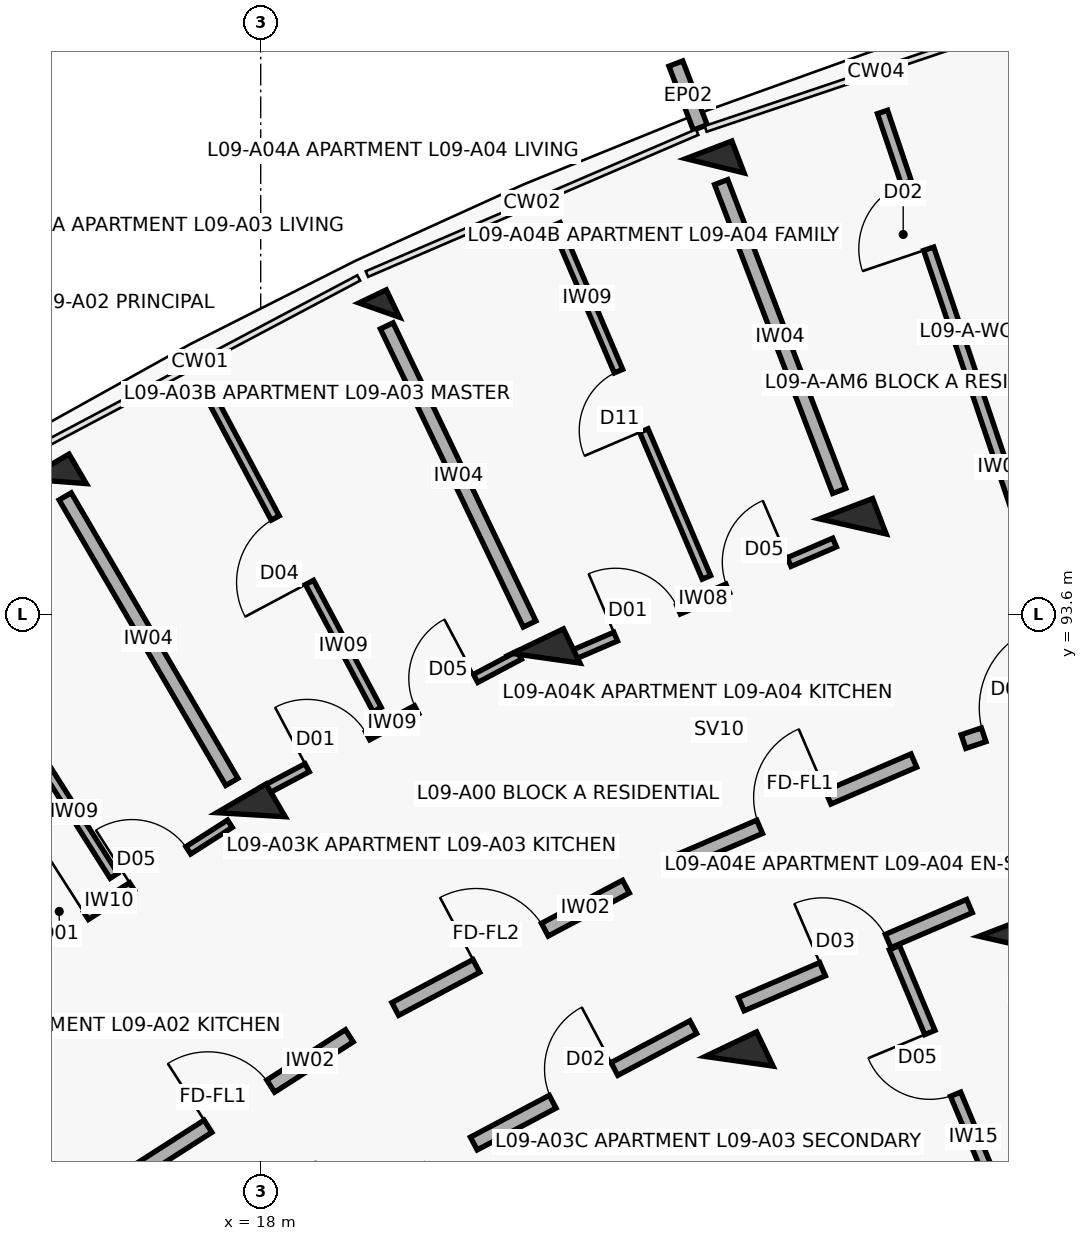
"""IFC4 building model, lengths in metres.
Left out: names, types, materials, properties, quantities, classifications, styles, units other than length and angle.
Written with IfcOpenShell. Run it as: python <this file> out.ifc"""

import sys

from ifc_helpers import new_model, si_unit, direction, frame, frame_2d, origin, origin_2d, place, context, subcontext, project, spatial, rectangle, extrude, element, fill, save


model = new_model("IFC4")
c1 = context("Model", 3, precision=1e-05, world=origin(), true_north=direction((0.0, 1.0)))
c2 = subcontext(c1, "Body", "Model", "MODEL_VIEW")
j1 = project(units=[si_unit("LENGTHUNIT", "METRE"), si_unit("PLANEANGLEUNIT", "RADIAN")], contexts=[c1])
p1 = place(None, origin())
s1 = spatial("IfcSite", under=j1, at=p1, CompositionType="ELEMENT")
p2 = place(p1, origin())
s2 = spatial("IfcBuilding", under=s1, at=p2, CompositionType="ELEMENT")
p3 = place(p2, frame((0.0, 0.0, 29.8)))
s3 = spatial("IfcBuildingStorey", under=s2, at=p3, CompositionType="ELEMENT", Elevation=29.8)
p4 = place(p3, frame((17.873, 90.96, 0.0), z_axis=(0.0, 0.0, 1.0), x_axis=(-0.504226211181, 0.863571611366, 0.0)))
e1 = element("IfcColumn", 1, at=p4, inside=s3, PredefinedType="COLUMN", context=c2, shape_type="SweptSolid", body=[
    extrude(rectangle(XDim=0.5, YDim=0.75, at=origin_2d()), origin(), (0.0, 0.0, 1.0), 3.1),
])
p5 = place(p3, frame((15.311, 95.347, 0.0), z_axis=(0.0, 0.0, 1.0), x_axis=(-0.504226211181, 0.863571611366, 0.0)))
e2 = element("IfcColumn", 2, at=p5, inside=s3, PredefinedType="COLUMN", context=c2, shape_type="SweptSolid", body=[
    extrude(rectangle(XDim=0.45, YDim=0.65, at=origin_2d()), origin(), (0.0, 0.0, 1.0), 3.1),
])
for number, where, z_axis, x_axis in (
    (3, (24.294, 87.716, 0.0), (0.0, 0.0, 1.0), (-0.432, 0.902, 0.0)),
    (4, (21.754, 93.019, 0.0), (0.0, 0.0, 1.0), (-0.432, 0.902, 0.0)),
):
    element("IfcColumn", number, at=place(p3, frame(where, z_axis=z_axis, x_axis=x_axis)), inside=s3, PredefinedType="COLUMN", context=c2, shape_type="SweptSolid", body=[
        extrude(rectangle(XDim=0.5, YDim=0.75, at=origin_2d()), origin(), (0.0, 0.0, 1.0), 3.1),
    ])
p6 = place(p3, frame((19.559, 97.6, 0.0), z_axis=(0.0, 0.0, 1.0), x_axis=(-0.432085748802, 0.901832526405, 0.0)))
e5 = element("IfcColumn", 5, at=p6, inside=s3, PredefinedType="COLUMN", context=c2, shape_type="SweptSolid", body=[
    extrude(rectangle(XDim=0.4, YDim=0.4, at=origin_2d()), origin(), (0.0, 0.0, 1.0), 3.1),
])
for number, where, z_axis, x_axis in (
    (6, (27.889, 89.261, 0.0), (0.0, 0.0, 1.0), (-0.357, 0.934, 0.0)),
    (7, (25.79, 94.753, 0.0), (0.0, 0.0, 1.0), (-0.357, 0.934, 0.0)),
):
    element("IfcColumn", number, at=place(p3, frame(where, z_axis=z_axis, x_axis=x_axis)), inside=s3, PredefinedType="COLUMN", context=c2, shape_type="SweptSolid", body=[
        extrude(rectangle(XDim=0.5, YDim=0.75, at=origin_2d()), origin(), (0.0, 0.0, 1.0), 3.1),
    ])
p7 = place(p3, frame((23.976, 99.499, 0.0), z_axis=(0.0, 0.0, 1.0), x_axis=(-0.357064076459, 0.934079892355, 0.0)))
e8 = element("IfcColumn", 8, at=p7, inside=s3, PredefinedType="COLUMN", context=c2, shape_type="SweptSolid", body=[
    extrude(rectangle(XDim=0.45, YDim=0.65, at=origin_2d()), origin(), (0.0, 0.0, 1.0), 3.1),
])
p8 = place(p3, frame((23.783, 100.003, 0.0), z_axis=(0.0, 0.0, 1.0), x_axis=(-0.356942580168, 0.934126326823, 0.0)))
e9 = element("IfcWall", 9, at=p8, inside=s3, PredefinedType="PARAPET", context=c2, shape_type="SweptSolid", body=[
    extrude(rectangle(XDim=0.9, YDim=0.195, at=frame_2d((0.45, 0.0))), origin(), (0.0, 0.0, 1.0), 2.25),
])
p9 = place(p3, frame((16.272, 86.199, 0.0), z_axis=(0.0, 0.0, 1.0), x_axis=(0.842257205985, 0.539075874963, 0.0)))
e10 = element("IfcWall", 10, at=p9, inside=s3, PredefinedType="SOLIDWALL", context=c2, shape_type="SweptSolid", body=[
    extrude(rectangle(XDim=3.436, YDim=0.19, at=frame_2d((1.718, 0.0))), origin(), (0.0, 0.0, 1.0), 2.08),
])
p10 = place(p9, frame((1.228, 0.0, 0.0)))
e11 = element("IfcOpeningElement", 11, at=p10, cuts=e10, PredefinedType="OPENING", context=c2, shape_type="SweptSolid", body=[
    extrude(rectangle(XDim=0.98, YDim=2.15, at=frame_2d((0.49, 1.075))), frame((0.0, 0.105, 0.0), z_axis=(0.0, -1.0, 0.0), x_axis=(1.0, 0.0, 0.0)), (0.0, 0.0, 1.0), 0.21),
])
p11 = place(p3, frame((14.396, 88.795, 0.0), z_axis=(0.0, 0.0, 1.0), x_axis=(0.842271400662, 0.539053696423, 0.0)))
e12 = element("IfcWall", 12, at=p11, inside=s3, PredefinedType="PARTITIONING", context=c2, shape_type="SweptSolid", body=[
    extrude(rectangle(XDim=3.797, YDim=0.115, at=frame_2d((1.898, 0.0))), origin(), (0.0, 0.0, 1.0), 2.08),
])
p12 = place(p11, frame((0.65, 0.0, 0.0)))
e13 = element("IfcOpeningElement", 13, at=p12, cuts=e12, PredefinedType="OPENING", context=c2, shape_type="SweptSolid", body=[
    extrude(rectangle(XDim=0.9, YDim=2.1, at=frame_2d((0.45, 1.05))), frame((0.0, 0.067, 0.0), z_axis=(0.0, -1.0, 0.0), x_axis=(1.0, 0.0, 0.0)), (0.0, 0.0, 1.0), 0.135),
])
p13 = place(p11, frame((2.267, 0.0, 0.0)))
e14 = element("IfcOpeningElement", 14, at=p13, cuts=e12, PredefinedType="OPENING", context=c2, shape_type="SweptSolid", body=[
    extrude(rectangle(XDim=0.88, YDim=2.1, at=frame_2d((0.44, 1.05))), frame((0.0, 0.067, 0.0), z_axis=(0.0, -1.0, 0.0), x_axis=(1.0, 0.0, 0.0)), (0.0, 0.0, 1.0), 0.135),
])
p14 = place(p3, frame((16.07, 90.156, 0.0), z_axis=(0.0, 0.0, 1.0), x_axis=(-0.535268985628, 0.84468166372, 0.0)))
e15 = element("IfcWall", 15, at=p14, inside=s3, PredefinedType="PARTITIONING", context=c2, shape_type="SweptSolid", body=[
    extrude(rectangle(XDim=4.9, YDim=0.12, at=frame_2d((2.45, 0.0))), origin(), (0.0, 0.0, 1.0), 2.08),
])
p15 = place(p14, frame((1.98, 0.0, 0.0)))
e16 = element("IfcOpeningElement", 16, at=p15, cuts=e15, PredefinedType="OPENING", context=c2, shape_type="SweptSolid", body=[
    extrude(rectangle(XDim=0.94, YDim=2.1, at=frame_2d((0.47, 1.05))), frame((0.0, 0.07, 0.0), z_axis=(0.0, -1.0, 0.0), x_axis=(1.0, 0.0, 0.0)), (0.0, 0.0, 1.0), 0.14),
])
p16 = place(p3, frame((19.77, 88.404, 0.0), z_axis=(0.0, 0.0, 1.0), x_axis=(0.883410853063, 0.468599258099, 0.0)))
e17 = element("IfcWall", 17, at=p16, inside=s3, PredefinedType="SOLIDWALL", context=c2, shape_type="SweptSolid", body=[
    extrude(rectangle(XDim=3.436, YDim=0.19, at=frame_2d((1.718, 0.0))), origin(), (0.0, 0.0, 1.0), 2.08),
])
p17 = place(p16, frame((1.208, 0.0, 0.0)))
e18 = element("IfcOpeningElement", 18, at=p17, cuts=e17, PredefinedType="OPENING", context=c2, shape_type="SweptSolid", body=[
    extrude(rectangle(XDim=1.02, YDim=2.15, at=frame_2d((0.51, 1.075))), frame((0.0, 0.105, 0.0), z_axis=(0.0, -1.0, 0.0), x_axis=(1.0, 0.0, 0.0)), (0.0, 0.0, 1.0), 0.21),
])
p18 = place(p3, frame((20.804, 86.634, 0.0), z_axis=(0.0, 0.0, 1.0), x_axis=(0.883444301944, 0.468536194293, 0.0)))
e19 = element("IfcWall", 19, at=p18, inside=s3, PredefinedType="SOLIDWALL", context=c2, shape_type="SweptSolid", body=[
    extrude(rectangle(XDim=3.269, YDim=0.19, at=frame_2d((1.634, 0.0))), origin(), (0.0, 0.0, 1.0), 2.08),
])
p19 = place(p18, frame((1.174, 0.0, 0.0)))
e20 = element("IfcOpeningElement", 20, at=p19, cuts=e19, PredefinedType="OPENING", context=c2, shape_type="SweptSolid", body=[
    extrude(rectangle(XDim=0.92, YDim=2.1, at=frame_2d((0.46, 1.05))), frame((0.0, 0.105, 0.0), z_axis=(0.0, -1.0, 0.0), x_axis=(1.0, 0.0, 0.0)), (0.0, 0.0, 1.0), 0.21),
])
p20 = place(p3, frame((18.037, 91.273, 0.0), z_axis=(0.0, 0.0, 1.0), x_axis=(0.883441603894, 0.468541281543, 0.0)))
e21 = element("IfcWall", 21, at=p20, inside=s3, PredefinedType="PARTITIONING", context=c2, shape_type="SweptSolid", body=[
    extrude(rectangle(XDim=3.81, YDim=0.12, at=frame_2d((1.905, 0.0))), origin(), (0.0, 0.0, 1.0), 2.08),
])
p21 = place(p20, frame((0.65, 0.0, 0.0)))
e22 = element("IfcOpeningElement", 22, at=p21, cuts=e21, PredefinedType="OPENING", context=c2, shape_type="SweptSolid", body=[
    extrude(rectangle(XDim=0.9, YDim=2.1, at=frame_2d((0.45, 1.05))), frame((0.0, 0.07, 0.0), z_axis=(0.0, -1.0, 0.0), x_axis=(1.0, 0.0, 0.0)), (0.0, 0.0, 1.0), 0.14),
])
p22 = place(p20, frame((2.28, 0.0, 0.0)))
e23 = element("IfcOpeningElement", 23, at=p22, cuts=e21, PredefinedType="OPENING", context=c2, shape_type="SweptSolid", body=[
    extrude(rectangle(XDim=0.88, YDim=2.1, at=frame_2d((0.44, 1.05))), frame((0.0, 0.07, 0.0), z_axis=(0.0, -1.0, 0.0), x_axis=(1.0, 0.0, 0.0)), (0.0, 0.0, 1.0), 0.14),
])
p23 = place(p3, frame((19.533, 92.344, 0.0), z_axis=(0.0, 0.0, 1.0), x_axis=(-0.469867814586, 0.882736787959, 0.0)))
e24 = element("IfcWall", 24, at=p23, inside=s3, PredefinedType="PARTITIONING", context=c2, shape_type="SweptSolid", body=[
    extrude(rectangle(XDim=4.75, YDim=0.12, at=frame_2d((2.375, 0.0))), origin(), (0.0, 0.0, 1.0), 2.08),
])
p24 = place(p23, frame((1.895, 0.0, 0.0)))
e25 = element("IfcOpeningElement", 25, at=p24, cuts=e24, PredefinedType="OPENING", context=c2, shape_type="SweptSolid", body=[
    extrude(rectangle(XDim=0.96, YDim=2.1, at=frame_2d((0.48, 1.05))), frame((0.0, 0.07, 0.0), z_axis=(0.0, -1.0, 0.0), x_axis=(1.0, 0.0, 0.0)), (0.0, 0.0, 1.0), 0.14),
])
p25 = place(p3, frame((17.621, 91.392, 0.0), z_axis=(0.0, 0.0, 1.0), x_axis=(-0.504216452091, 0.863577309475, 0.0)))
e26 = element("IfcWall", 26, at=p25, inside=s3, PredefinedType="SOLIDWALL", context=c2, shape_type="SweptSolid", body=[
    extrude(rectangle(XDim=4.35, YDim=0.185, at=frame_2d((2.175, 0.0))), origin(), (0.0, 0.0, 1.0), 2.08),
])
p26 = place(p3, frame((23.437, 90.316, 0.0), z_axis=(0.0, 0.0, 1.0), x_axis=(0.918718172399, 0.394913813008, 0.0)))
e27 = element("IfcWall", 27, at=p26, inside=s3, PredefinedType="SOLIDWALL", context=c2, shape_type="SweptSolid", body=[
    extrude(rectangle(XDim=3.436, YDim=0.19, at=frame_2d((1.718, 0.0))), origin(), (0.0, 0.0, 1.0), 2.08),
])
p27 = place(p26, frame((1.228, 0.0, 0.0)))
e28 = element("IfcOpeningElement", 28, at=p27, cuts=e27, PredefinedType="OPENING", context=c2, shape_type="SweptSolid", body=[
    extrude(rectangle(XDim=0.98, YDim=2.15, at=frame_2d((0.49, 1.075))), frame((0.0, 0.105, 0.0), z_axis=(0.0, -1.0, 0.0), x_axis=(1.0, 0.0, 0.0)), (0.0, 0.0, 1.0), 0.21),
])
p28 = place(p3, frame((24.322, 88.467, 0.0), z_axis=(0.0, 0.0, 1.0), x_axis=(0.918723391052, 0.394901672235, 0.0)))
e29 = element("IfcWall", 29, at=p28, inside=s3, PredefinedType="SOLIDWALL", context=c2, shape_type="SweptSolid", body=[
    extrude(rectangle(XDim=3.269, YDim=0.19, at=frame_2d((1.634, 0.0))), origin(), (0.0, 0.0, 1.0), 2.08),
])
p29 = place(p28, frame((1.164, 0.0, 0.0)))
e30 = element("IfcOpeningElement", 30, at=p29, cuts=e29, PredefinedType="OPENING", context=c2, shape_type="SweptSolid", body=[
    extrude(rectangle(XDim=0.94, YDim=2.1, at=frame_2d((0.47, 1.05))), frame((0.0, 0.105, 0.0), z_axis=(0.0, -1.0, 0.0), x_axis=(1.0, 0.0, 0.0)), (0.0, 0.0, 1.0), 0.21),
])
p30 = place(p3, frame((27.609, 86.166, 0.0), z_axis=(0.0, 0.0, 1.0), x_axis=(-0.385151143297, 0.922853507777, 0.0)))
e31 = element("IfcWall", 31, at=p30, inside=s3, PredefinedType="PARTITIONING", context=c2, shape_type="SweptSolid", body=[
    extrude(rectangle(XDim=3.3, YDim=0.145, at=frame_2d((1.65, 0.0))), origin(), (0.0, 0.0, 1.0), 2.08),
])
p31 = place(p30, frame((1.21, 0.0, 0.0)))
e32 = element("IfcOpeningElement", 32, at=p31, cuts=e31, PredefinedType="OPENING", context=c2, shape_type="SweptSolid", body=[
    extrude(rectangle(XDim=0.88, YDim=2.1, at=frame_2d((0.44, 1.05))), frame((0.0, 0.083, 0.0), z_axis=(0.0, -1.0, 0.0), x_axis=(1.0, 0.0, 0.0)), (0.0, 0.0, 1.0), 0.165),
])
p32 = place(p3, frame((22.073, 93.047, 0.0), z_axis=(0.0, 0.0, 1.0), x_axis=(0.918737522346, 0.394868794707, 0.0)))
e33 = element("IfcWall", 33, at=p32, inside=s3, PredefinedType="PARTITIONING", context=c2, shape_type="SweptSolid", body=[
    extrude(rectangle(XDim=3.785, YDim=0.125, at=frame_2d((1.893, 0.0))), origin(), (0.0, 0.0, 1.0), 2.08),
])
p33 = place(p32, frame((0.65, 0.0, 0.0)))
e34 = element("IfcOpeningElement", 34, at=p33, cuts=e33, PredefinedType="OPENING", context=c2, shape_type="SweptSolid", body=[
    extrude(rectangle(XDim=0.9, YDim=2.1, at=frame_2d((0.45, 1.05))), frame((0.0, 0.073, 0.0), z_axis=(0.0, -1.0, 0.0), x_axis=(1.0, 0.0, 0.0)), (0.0, 0.0, 1.0), 0.145),
])
p34 = place(p32, frame((2.255, 0.0, 0.0)))
e35 = element("IfcOpeningElement", 35, at=p34, cuts=e33, PredefinedType="OPENING", context=c2, shape_type="SweptSolid", body=[
    extrude(rectangle(XDim=0.88, YDim=2.1, at=frame_2d((0.44, 1.05))), frame((0.0, 0.073, 0.0), z_axis=(0.0, -1.0, 0.0), x_axis=(1.0, 0.0, 0.0)), (0.0, 0.0, 1.0), 0.145),
])
p35 = place(p3, frame((23.864, 94.083, 0.0), z_axis=(0.0, 0.0, 1.0), x_axis=(-0.392109841969, 0.919918404985, 0.0)))
e36 = element("IfcWall", 36, at=p35, inside=s3, PredefinedType="PARTITIONING", context=c2, shape_type="SweptSolid", body=[
    extrude(rectangle(XDim=5.05, YDim=0.12, at=frame_2d((2.525, 0.0))), origin(), (0.0, 0.0, 1.0), 2.08),
])
p36 = place(p35, frame((2.1, 0.0, 0.0)))
e37 = element("IfcOpeningElement", 37, at=p36, cuts=e36, PredefinedType="OPENING", context=c2, shape_type="SweptSolid", body=[
    extrude(rectangle(XDim=0.85, YDim=2.1, at=frame_2d((0.425, 1.05))), frame((0.0, 0.07, 0.0), z_axis=(0.0, -1.0, 0.0), x_axis=(1.0, 0.0, 0.0)), (0.0, 0.0, 1.0), 0.14),
])
p37 = place(p3, frame((21.538, 93.469, 0.0), z_axis=(0.0, 0.0, 1.0), x_axis=(-0.432086898897, 0.901831975371, 0.0)))
e38 = element("IfcWall", 38, at=p37, inside=s3, PredefinedType="SOLIDWALL", context=c2, shape_type="SweptSolid", body=[
    extrude(rectangle(XDim=4.35, YDim=0.185, at=frame_2d((2.175, 0.0))), origin(), (0.0, 0.0, 1.0), 2.08),
])
p38 = place(p3, frame((27.247, 91.923, 0.0), z_axis=(0.0, 0.0, 1.0), x_axis=(0.947863007629, 0.318678080151, 0.0)))
e39 = element("IfcWall", 39, at=p38, inside=s3, PredefinedType="SOLIDWALL", context=c2, shape_type="SweptSolid", body=[
    extrude(rectangle(XDim=3.436, YDim=0.19, at=frame_2d((1.718, 0.0))), origin(), (0.0, 0.0, 1.0), 2.08),
])
p39 = place(p38, frame((0.28, 0.0, 0.0)))
e40 = element("IfcOpeningElement", 40, at=p39, cuts=e39, PredefinedType="OPENING", context=c2, shape_type="SweptSolid", body=[
    extrude(rectangle(XDim=1.12, YDim=2.15, at=frame_2d((0.56, 1.075))), frame((0.0, 0.105, 0.0), z_axis=(0.0, -1.0, 0.0), x_axis=(1.0, 0.0, 0.0)), (0.0, 0.0, 1.0), 0.21),
])
p40 = place(p38, frame((2.266, 0.0, 0.0)))
e41 = element("IfcOpeningElement", 41, at=p40, cuts=e39, PredefinedType="OPENING", context=c2, shape_type="SweptSolid", body=[
    extrude(rectangle(XDim=0.95, YDim=2.1, at=frame_2d((0.475, 1.05))), frame((0.0, 0.105, 0.0), z_axis=(0.0, -1.0, 0.0), x_axis=(1.0, 0.0, 0.0)), (0.0, 0.0, 1.0), 0.21),
])
p41 = place(p3, frame((28.725, 92.675, 0.0), z_axis=(0.0, 0.0, 1.0), x_axis=(-0.320057771325, 0.947398027766, 0.0)))
e42 = element("IfcWall", 42, at=p41, inside=s3, PredefinedType="PARTITIONING", context=c2, shape_type="SweptSolid", body=[
    extrude(rectangle(XDim=7.95, YDim=0.14, at=frame_2d((3.975, 0.0))), origin(), (0.0, 0.0, 1.0), 2.08),
])
p42 = place(p41, frame((6.05, 0.0, 0.0)))
e43 = element("IfcOpeningElement", 43, at=p42, cuts=e42, PredefinedType="OPENING", context=c2, shape_type="SweptSolid", body=[
    extrude(rectangle(XDim=0.92, YDim=2.1, at=frame_2d((0.46, 1.05))), frame((0.0, 0.08, 0.0), z_axis=(0.0, -1.0, 0.0), x_axis=(1.0, 0.0, 0.0)), (0.0, 0.0, 1.0), 0.16),
])
p43 = place(p3, frame((25.611, 95.22, 0.0), z_axis=(0.0, 0.0, 1.0), x_axis=(-0.357064016205, 0.934079915388, 0.0)))
e44 = element("IfcWall", 44, at=p43, inside=s3, PredefinedType="SOLIDWALL", context=c2, shape_type="SweptSolid", body=[
    extrude(rectangle(XDim=4.35, YDim=0.185, at=frame_2d((2.175, 0.0))), origin(), (0.0, 0.0, 1.0), 2.08),
])
p44 = place(p10, origin())
e45 = element("IfcDoor", 45, at=p44, inside=s3, OperationType="SINGLE_SWING_LEFT", PredefinedType="DOOR", context=c2, shape_type="SweptSolid", body=[
    extrude(rectangle(XDim=0.98, YDim=2.15, at=frame_2d((0.49, 1.075))), frame((0.0, 0.025, 0.0), z_axis=(0.0, -1.0, 0.0), x_axis=(1.0, 0.0, 0.0)), (0.0, 0.0, 1.0), 0.05),
])
fill(e11, e45)
p45 = place(p12, origin())
e46 = element("IfcDoor", 46, at=p45, inside=s3, OperationType="SINGLE_SWING_RIGHT", PredefinedType="DOOR", context=c2, shape_type="SweptSolid", body=[
    extrude(rectangle(XDim=0.9, YDim=2.1, at=frame_2d((0.45, 1.05))), frame((0.0, 0.025, 0.0), z_axis=(0.0, -1.0, 0.0), x_axis=(1.0, 0.0, 0.0)), (0.0, 0.0, 1.0), 0.05),
])
fill(e13, e46)
p46 = place(p13, origin())
e47 = element("IfcDoor", 47, at=p46, inside=s3, OperationType="SINGLE_SWING_LEFT", PredefinedType="DOOR", context=c2, shape_type="SweptSolid", body=[
    extrude(rectangle(XDim=0.88, YDim=2.1, at=frame_2d((0.44, 1.05))), frame((0.0, 0.025, 0.0), z_axis=(0.0, -1.0, 0.0), x_axis=(1.0, 0.0, 0.0)), (0.0, 0.0, 1.0), 0.05),
])
fill(e14, e47)
p47 = place(p17, origin())
e48 = element("IfcDoor", 48, at=p47, inside=s3, OperationType="SINGLE_SWING_LEFT", PredefinedType="DOOR", context=c2, shape_type="SweptSolid", body=[
    extrude(rectangle(XDim=1.02, YDim=2.15, at=frame_2d((0.51, 1.075))), frame((0.0, 0.025, 0.0), z_axis=(0.0, -1.0, 0.0), x_axis=(1.0, 0.0, 0.0)), (0.0, 0.0, 1.0), 0.05),
])
fill(e18, e48)
p48 = place(p19, origin())
e49 = element("IfcDoor", 49, at=p48, inside=s3, OperationType="SINGLE_SWING_RIGHT", PredefinedType="DOOR", context=c2, shape_type="SweptSolid", body=[
    extrude(rectangle(XDim=0.92, YDim=2.1, at=frame_2d((0.46, 1.05))), frame((0.0, 0.025, 0.0), z_axis=(0.0, -1.0, 0.0), x_axis=(1.0, 0.0, 0.0)), (0.0, 0.0, 1.0), 0.05),
])
fill(e20, e49)
p49 = place(p21, origin())
e50 = element("IfcDoor", 50, at=p49, inside=s3, OperationType="SINGLE_SWING_LEFT", PredefinedType="DOOR", context=c2, shape_type="SweptSolid", body=[
    extrude(rectangle(XDim=0.9, YDim=2.1, at=frame_2d((0.45, 1.05))), frame((0.0, 0.025, 0.0), z_axis=(0.0, -1.0, 0.0), x_axis=(1.0, 0.0, 0.0)), (0.0, 0.0, 1.0), 0.05),
])
fill(e22, e50)
p50 = place(p22, origin())
e51 = element("IfcDoor", 51, at=p50, inside=s3, OperationType="SINGLE_SWING_RIGHT", PredefinedType="DOOR", context=c2, shape_type="SweptSolid", body=[
    extrude(rectangle(XDim=0.88, YDim=2.1, at=frame_2d((0.44, 1.05))), frame((0.0, 0.025, 0.0), z_axis=(0.0, -1.0, 0.0), x_axis=(1.0, 0.0, 0.0)), (0.0, 0.0, 1.0), 0.05),
])
fill(e23, e51)
p51 = place(p24, origin())
e52 = element("IfcDoor", 52, at=p51, inside=s3, OperationType="SINGLE_SWING_LEFT", PredefinedType="DOOR", context=c2, shape_type="SweptSolid", body=[
    extrude(rectangle(XDim=0.96, YDim=2.1, at=frame_2d((0.48, 1.05))), frame((0.0, 0.025, 0.0), z_axis=(0.0, -1.0, 0.0), x_axis=(1.0, 0.0, 0.0)), (0.0, 0.0, 1.0), 0.05),
])
fill(e25, e52)
p52 = place(p27, origin())
e53 = element("IfcDoor", 53, at=p52, inside=s3, OperationType="SINGLE_SWING_RIGHT", PredefinedType="DOOR", context=c2, shape_type="SweptSolid", body=[
    extrude(rectangle(XDim=0.98, YDim=2.15, at=frame_2d((0.49, 1.075))), frame((0.0, 0.025, 0.0), z_axis=(0.0, -1.0, 0.0), x_axis=(1.0, 0.0, 0.0)), (0.0, 0.0, 1.0), 0.05),
])
fill(e28, e53)
p53 = place(p29, origin())
e54 = element("IfcDoor", 54, at=p53, inside=s3, OperationType="SINGLE_SWING_LEFT", PredefinedType="DOOR", context=c2, shape_type="SweptSolid", body=[
    extrude(rectangle(XDim=0.94, YDim=2.1, at=frame_2d((0.47, 1.05))), frame((0.0, 0.025, 0.0), z_axis=(0.0, -1.0, 0.0), x_axis=(1.0, 0.0, 0.0)), (0.0, 0.0, 1.0), 0.05),
])
fill(e30, e54)
p54 = place(p31, origin())
e55 = element("IfcDoor", 55, at=p54, inside=s3, OperationType="SINGLE_SWING_RIGHT", PredefinedType="DOOR", context=c2, shape_type="SweptSolid", body=[
    extrude(rectangle(XDim=0.88, YDim=2.1, at=frame_2d((0.44, 1.05))), frame((0.0, 0.025, 0.0), z_axis=(0.0, -1.0, 0.0), x_axis=(1.0, 0.0, 0.0)), (0.0, 0.0, 1.0), 0.05),
])
fill(e32, e55)
p55 = place(p33, origin())
e56 = element("IfcDoor", 56, at=p55, inside=s3, OperationType="SINGLE_SWING_LEFT", PredefinedType="DOOR", context=c2, shape_type="SweptSolid", body=[
    extrude(rectangle(XDim=0.9, YDim=2.1, at=frame_2d((0.45, 1.05))), frame((0.0, 0.025, 0.0), z_axis=(0.0, -1.0, 0.0), x_axis=(1.0, 0.0, 0.0)), (0.0, 0.0, 1.0), 0.05),
])
fill(e34, e56)
p56 = place(p34, origin())
e57 = element("IfcDoor", 57, at=p56, inside=s3, OperationType="SINGLE_SWING_RIGHT", PredefinedType="DOOR", context=c2, shape_type="SweptSolid", body=[
    extrude(rectangle(XDim=0.88, YDim=2.1, at=frame_2d((0.44, 1.05))), frame((0.0, 0.025, 0.0), z_axis=(0.0, -1.0, 0.0), x_axis=(1.0, 0.0, 0.0)), (0.0, 0.0, 1.0), 0.05),
])
fill(e35, e57)
p57 = place(p36, origin())
e58 = element("IfcDoor", 58, at=p57, inside=s3, OperationType="SINGLE_SWING_LEFT", PredefinedType="DOOR", context=c2, shape_type="SweptSolid", body=[
    extrude(rectangle(XDim=0.85, YDim=2.1, at=frame_2d((0.425, 1.05))), frame((0.0, 0.025, 0.0), z_axis=(0.0, -1.0, 0.0), x_axis=(1.0, 0.0, 0.0)), (0.0, 0.0, 1.0), 0.05),
])
fill(e37, e58)
p58 = place(p39, origin())
e59 = element("IfcDoor", 59, at=p58, inside=s3, OperationType="SINGLE_SWING_RIGHT", PredefinedType="DOOR", context=c2, shape_type="SweptSolid", body=[
    extrude(rectangle(XDim=1.12, YDim=2.15, at=frame_2d((0.56, 1.075))), frame((0.0, 0.025, 0.0), z_axis=(0.0, -1.0, 0.0), x_axis=(1.0, 0.0, 0.0)), (0.0, 0.0, 1.0), 0.05),
])
fill(e40, e59)
p59 = place(p42, origin())
e60 = element("IfcDoor", 60, at=p59, inside=s3, OperationType="SINGLE_SWING_LEFT", PredefinedType="DOOR", context=c2, shape_type="SweptSolid", body=[
    extrude(rectangle(XDim=0.92, YDim=2.1, at=frame_2d((0.46, 1.05))), frame((0.0, 0.025, 0.0), z_axis=(0.0, -1.0, 0.0), x_axis=(1.0, 0.0, 0.0)), (0.0, 0.0, 1.0), 0.05),
])
fill(e43, e60)
save(model, sys.argv[1])
